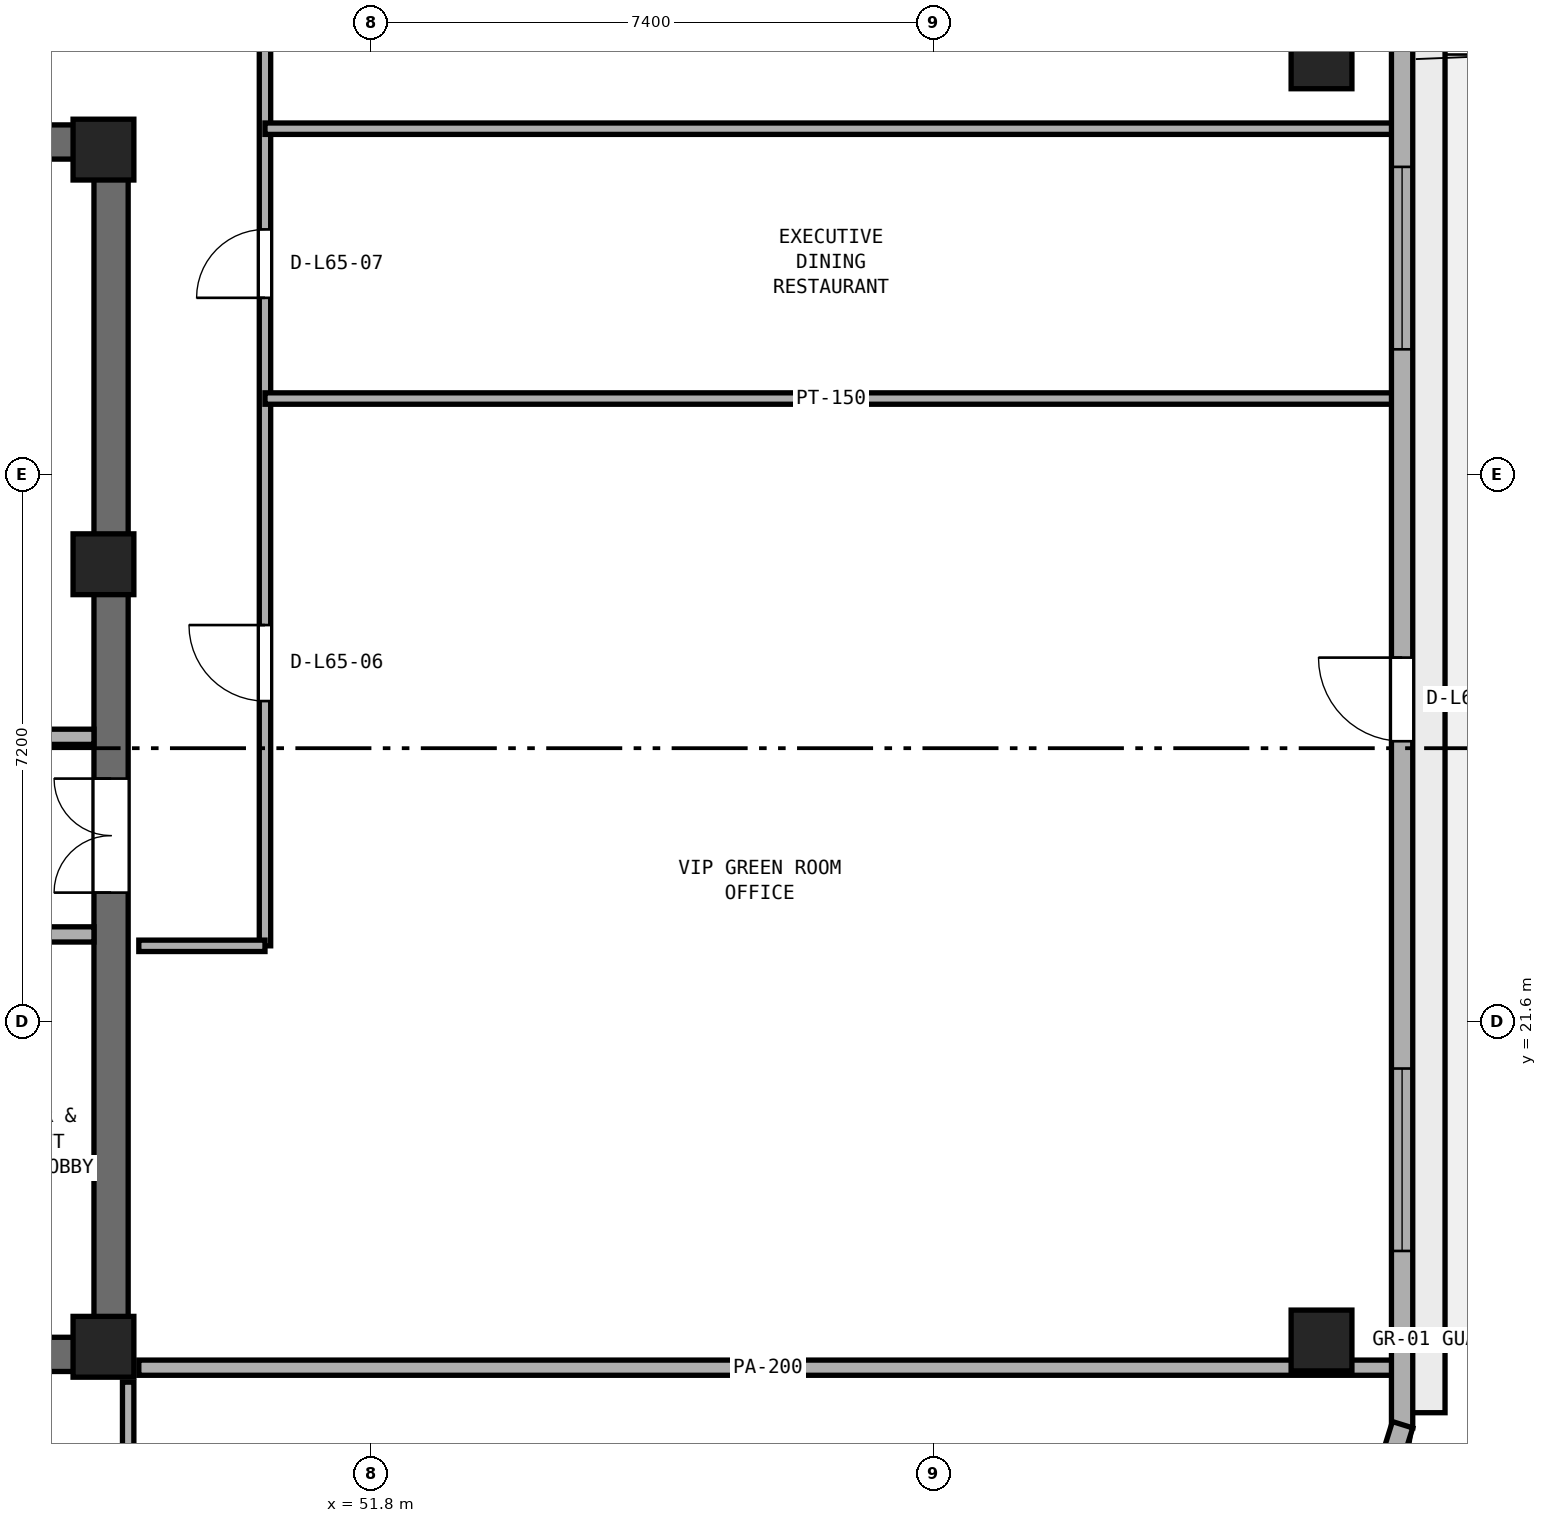
"""IFC4 building model, lengths in metres.
Left out: names, types, materials, properties, quantities, classifications, styles, units other than length and angle.
Written with IfcOpenShell. Run it as: python <this file> out.ifc"""

import sys

from ifc_helpers import new_model, si_unit, direction, frame, frame_2d, origin, origin_2d, place, context, subcontext, project, spatial, rectangle, extrude, element, fill, save


model = new_model("IFC4")
c1 = context("Model", 3, precision=1e-05, world=origin(), true_north=direction((0.0, 1.0)))
c2 = subcontext(c1, "Body", "Model", "MODEL_VIEW")
j1 = project(units=[si_unit("LENGTHUNIT", "METRE"), si_unit("PLANEANGLEUNIT", "RADIAN")], contexts=[c1])
p1 = place(None, origin())
s1 = spatial("IfcSite", under=j1, at=p1, CompositionType="ELEMENT")
p2 = place(p1, origin())
s2 = spatial("IfcBuilding", under=s1, at=p2, CompositionType="ELEMENT")
p3 = place(p2, frame((0.0, 0.0, 255.4)))
s3 = spatial("IfcBuildingStorey", under=s2, at=p3, CompositionType="ELEMENT", Elevation=255.4)
for number, where, z_axis, x_axis in (
    (1, (25.4, 17.225, 0.0), (0.0, 0.0, 1.0), (1.0, 0.0, 0.0)),
    (2, (25.4, 33.175, 0.0), (0.0, 0.0, 1.0), (1.0, 0.0, 0.0)),
):
    element("IfcWall", number, at=place(p3, frame(where, z_axis=z_axis, x_axis=x_axis)), inside=s3, PredefinedType="SHEAR", context=c2, shape_type="SweptSolid", body=[
        extrude(rectangle(XDim=23.2, YDim=0.45, at=frame_2d((11.6, 0.0))), origin(), (0.0, 0.0, 1.0), 3.51),
    ])
p4 = place(p3, frame((48.375, 17.45, 0.0), z_axis=(0.0, 0.0, 1.0), x_axis=(0.0, 1.0, 0.0)))
e3 = element("IfcWall", 3, at=p4, inside=s3, PredefinedType="SHEAR", context=c2, shape_type="SweptSolid", body=[
    extrude(rectangle(XDim=15.5, YDim=0.45, at=frame_2d((7.75, 0.0))), origin(), (0.0, 0.0, 1.0), 3.51),
])
p5 = place(p4, frame((5.85, 0.0, 0.0)))
e4 = element("IfcOpeningElement", 4, at=p5, cuts=e3, PredefinedType="OPENING", context=c2, shape_type="SweptSolid", body=[
    extrude(rectangle(XDim=1.5, YDim=2.15, at=frame_2d((0.75, 1.075))), frame((0.0, 0.235, 0.0), z_axis=(0.0, -1.0, 0.0), x_axis=(1.0, 0.0, 0.0)), (0.0, 0.0, 1.0), 0.47),
])
for number, where, z_axis, x_axis in (
    (5, (48.275, 17.325, 0.0), (0.0, 0.0, 1.0), (1.0, 0.0, 0.0)),
    (6, (48.275, 27.62, 0.0), (0.0, 0.0, 1.0), (1.0, 0.0, 0.0)),
    (7, (48.275, 33.075, 0.0), (0.0, 0.0, 1.0), (1.0, 0.0, 0.0)),
):
    element("IfcColumn", number, at=place(p3, frame(where, z_axis=z_axis, x_axis=x_axis)), inside=s3, PredefinedType="PILASTER", context=c2, shape_type="SweptSolid", body=[
        extrude(rectangle(XDim=0.8, YDim=0.8, at=origin_2d()), origin(), (0.0, 0.0, 1.0), 3.8),
    ])
for number, where, z_axis, x_axis in (
    (8, (64.3, 17.408, 0.0), (0.0, 0.0, 1.0), (1.0, 0.0, 0.0)),
    (9, (64.3, 34.276, 0.0), (0.0, 0.0, 1.0), (1.0, 0.0, 0.0)),
):
    element("IfcColumn", number, at=place(p3, frame(where, z_axis=z_axis, x_axis=x_axis)), inside=s3, PredefinedType="COLUMN", context=c2, shape_type="SweptSolid", body=[
        extrude(rectangle(XDim=0.8, YDim=0.8, at=origin_2d()), origin(), (0.0, 0.0, 1.0), 3.8),
    ])
p6 = place(p3, frame((42.0, 22.75, 0.0), z_axis=(0.0, 0.0, 1.0), x_axis=(1.0, 0.0, 0.0)))
e10 = element("IfcWall", 10, at=p6, inside=s3, PredefinedType="SOLIDWALL", context=c2, shape_type="SweptSolid", body=[
    extrude(rectangle(XDim=6.15, YDim=0.2, at=frame_2d((3.075, 0.0))), origin(), (0.0, 0.0, 1.0), 3.51),
])
p7 = place(p3, frame((46.1, 25.35, 0.0), z_axis=(0.0, 0.0, 1.0), x_axis=(1.0, 0.0, 0.0)))
e11 = element("IfcWall", 11, at=p7, inside=s3, PredefinedType="SOLIDWALL", context=c2, shape_type="SweptSolid", body=[
    extrude(rectangle(XDim=2.05, YDim=0.2, at=frame_2d((1.025, 0.0))), origin(), (0.0, 0.0, 1.0), 3.51),
])
p8 = place(p3, frame((50.4, 22.6, 0.0), z_axis=(0.0, 0.0, 1.0), x_axis=(0.0, 1.0, 0.0)))
e12 = element("IfcWall", 12, at=p8, inside=s3, PredefinedType="PARTITIONING", context=c2, shape_type="SweptSolid", body=[
    extrude(rectangle(XDim=12.6, YDim=0.15, at=frame_2d((6.3, 0.0))), origin(), (0.0, 0.0, 1.0), 3.51),
])
p9 = place(p8, frame((3.22, 0.0, 0.0)))
e13 = element("IfcOpeningElement", 13, at=p9, cuts=e12, PredefinedType="OPENING", context=c2, shape_type="SweptSolid", body=[
    extrude(rectangle(XDim=1.0, YDim=2.12, at=frame_2d((0.5, 1.06))), frame((0.0, 0.085, 0.0), z_axis=(0.0, -1.0, 0.0), x_axis=(1.0, 0.0, 0.0)), (0.0, 0.0, 1.0), 0.17),
])
p10 = place(p8, frame((8.525, 0.0, 0.0)))
e14 = element("IfcOpeningElement", 14, at=p10, cuts=e12, PredefinedType="OPENING", context=c2, shape_type="SweptSolid", body=[
    extrude(rectangle(XDim=0.9, YDim=2.1, at=frame_2d((0.45, 1.05))), frame((0.0, 0.085, 0.0), z_axis=(0.0, -1.0, 0.0), x_axis=(1.0, 0.0, 0.0)), (0.0, 0.0, 1.0), 0.17),
])
p11 = place(p3, frame((48.6, 15.2, 0.0), z_axis=(0.0, 0.0, 1.0), x_axis=(0.0, 1.0, 0.0)))
e15 = element("IfcWall", 15, at=p11, inside=s3, PredefinedType="PARTITIONING", context=c2, shape_type="SweptSolid", body=[
    extrude(rectangle(XDim=1.66, YDim=0.15, at=frame_2d((0.83, 0.0))), origin(), (0.0, 0.0, 1.0), 2.893),
])
p12 = place(p3, frame((48.74, 17.05, 0.0), z_axis=(0.0, 0.0, 1.0), x_axis=(1.0, 0.0, 0.0)))
e16 = element("IfcWall", 16, at=p12, inside=s3, PredefinedType="PARTITIONING", context=c2, shape_type="SweptSolid", body=[
    extrude(rectangle(XDim=16.555, YDim=0.2, at=frame_2d((8.277, 0.0))), origin(), (0.0, 0.0, 1.0), 2.893),
])
p13 = place(p3, frame((48.74, 22.6, 0.0), z_axis=(0.0, 0.0, 1.0), x_axis=(1.0, 0.0, 0.0)))
e17 = element("IfcWall", 17, at=p13, inside=s3, PredefinedType="PARTITIONING", context=c2, shape_type="SweptSolid", body=[
    extrude(rectangle(XDim=1.66, YDim=0.15, at=frame_2d((0.83, 0.0))), origin(), (0.0, 0.0, 1.0), 3.51),
])
p14 = place(p3, frame((50.4, 29.8, 0.0), z_axis=(0.0, 0.0, 1.0), x_axis=(1.0, 0.0, 0.0)))
e18 = element("IfcWall", 18, at=p14, inside=s3, PredefinedType="PARTITIONING", context=c2, shape_type="SweptSolid", body=[
    extrude(rectangle(XDim=14.895, YDim=0.15, at=frame_2d((7.448, 0.0))), origin(), (0.0, 0.0, 1.0), 3.51),
])
p15 = place(p3, frame((50.4, 33.35, 0.0), z_axis=(0.0, 0.0, 1.0), x_axis=(1.0, 0.0, 0.0)))
e19 = element("IfcWall", 19, at=p15, inside=s3, PredefinedType="PARTITIONING", context=c2, shape_type="SweptSolid", body=[
    extrude(rectangle(XDim=14.895, YDim=0.15, at=frame_2d((7.448, 0.0))), origin(), (0.0, 0.0, 1.0), 2.893),
])
p16 = place(p3, frame((65.36, 16.258, 0.0), z_axis=(0.0, 0.0, 1.0), x_axis=(0.0, 1.0, 0.0)))
e20 = element("IfcWall", 20, at=p16, inside=s3, PredefinedType="STANDARD", context=c2, shape_type="SweptSolid", body=[
    extrude(rectangle(XDim=19.168, YDim=0.28, at=frame_2d((9.584, 0.0))), origin(), (0.0, 0.0, 1.0), 3.51),
])
p17 = place(p16, frame((9.034, 0.0, 0.0)))
e21 = element("IfcOpeningElement", 21, at=p17, cuts=e20, PredefinedType="OPENING", context=c2, shape_type="SweptSolid", body=[
    extrude(rectangle(XDim=1.1, YDim=2.2, at=frame_2d((0.55, 1.1))), frame((0.0, 0.15, 0.0), z_axis=(0.0, -1.0, 0.0), x_axis=(1.0, 0.0, 0.0)), (0.0, 0.0, 1.0), 0.3),
])
p18 = place(p16, frame((2.328, 0.0, 0.9)))
e22 = element("IfcOpeningElement", 22, at=p18, cuts=e20, PredefinedType="OPENING", context=c2, shape_type="SweptSolid", body=[
    extrude(rectangle(XDim=2.4, YDim=1.75, at=frame_2d((1.2, 0.875))), frame((0.0, 0.15, 0.0), z_axis=(0.0, -1.0, 0.0), x_axis=(1.0, 0.0, 0.0)), (0.0, 0.0, 1.0), 0.3),
])
p19 = place(p16, frame((14.19, 0.0, 0.9)))
e23 = element("IfcOpeningElement", 23, at=p19, cuts=e20, PredefinedType="OPENING", context=c2, shape_type="SweptSolid", body=[
    extrude(rectangle(XDim=2.4, YDim=1.75, at=frame_2d((1.2, 0.875))), frame((0.0, 0.15, 0.0), z_axis=(0.0, -1.0, 0.0), x_axis=(1.0, 0.0, 0.0)), (0.0, 0.0, 1.0), 0.3),
])
p20 = place(p3, frame((64.635, 13.962, 0.0), z_axis=(0.0, 0.0, 1.0), x_axis=(0.298649578722, 0.954362839348, 0.0)))
e24 = element("IfcWall", 24, at=p20, inside=s3, PredefinedType="STANDARD", context=c2, shape_type="SweptSolid", body=[
    extrude(rectangle(XDim=2.449, YDim=0.28, at=frame_2d((1.225, 0.0))), origin(), (0.0, 0.0, 1.0), 3.51),
])
p21 = place(p5, origin())
e25 = element("IfcDoor", 25, at=p21, inside=s3, OperationType="DOUBLE_DOOR_SINGLE_SWING", PredefinedType="DOOR", context=c2, shape_type="SweptSolid", body=[
    extrude(rectangle(XDim=1.5, YDim=2.15, at=frame_2d((0.75, 1.075))), frame((0.0, 0.025, 0.0), z_axis=(0.0, -1.0, 0.0), x_axis=(1.0, 0.0, 0.0)), (0.0, 0.0, 1.0), 0.05),
])
fill(e4, e25)
p22 = place(p9, origin())
e26 = element("IfcDoor", 26, at=p22, inside=s3, OperationType="SINGLE_SWING_RIGHT", PredefinedType="DOOR", context=c2, shape_type="SweptSolid", body=[
    extrude(rectangle(XDim=1.0, YDim=2.12, at=frame_2d((0.5, 1.06))), frame((0.0, 0.025, 0.0), z_axis=(0.0, -1.0, 0.0), x_axis=(1.0, 0.0, 0.0)), (0.0, 0.0, 1.0), 0.05),
])
fill(e13, e26)
p23 = place(p10, origin())
e27 = element("IfcDoor", 27, at=p23, inside=s3, OperationType="SINGLE_SWING_LEFT", PredefinedType="DOOR", context=c2, shape_type="SweptSolid", body=[
    extrude(rectangle(XDim=0.9, YDim=2.1, at=frame_2d((0.45, 1.05))), frame((0.0, 0.025, 0.0), z_axis=(0.0, -1.0, 0.0), x_axis=(1.0, 0.0, 0.0)), (0.0, 0.0, 1.0), 0.05),
])
fill(e14, e27)
p24 = place(p17, origin())
e28 = element("IfcDoor", 28, at=p24, inside=s3, OperationType="SINGLE_SWING_RIGHT", PredefinedType="DOOR", context=c2, shape_type="SweptSolid", body=[
    extrude(rectangle(XDim=1.1, YDim=2.2, at=frame_2d((0.55, 1.1))), frame((0.0, 0.025, 0.0), z_axis=(0.0, -1.0, 0.0), x_axis=(1.0, 0.0, 0.0)), (0.0, 0.0, 1.0), 0.05),
])
fill(e21, e28)
p25 = place(p18, origin())
e29 = element("IfcWindow", 29, at=p25, inside=s3, PartitioningType="SINGLE_PANEL", PredefinedType="WINDOW", context=c2, shape_type="SweptSolid", body=[
    extrude(rectangle(XDim=2.4, YDim=1.75, at=frame_2d((1.2, 0.875))), frame((0.0, 0.03, 0.0), z_axis=(0.0, -1.0, 0.0), x_axis=(1.0, 0.0, 0.0)), (0.0, 0.0, 1.0), 0.06),
])
fill(e22, e29)
p26 = place(p19, origin())
e30 = element("IfcWindow", 30, at=p26, inside=s3, PartitioningType="SINGLE_PANEL", PredefinedType="WINDOW", context=c2, shape_type="SweptSolid", body=[
    extrude(rectangle(XDim=2.4, YDim=1.75, at=frame_2d((1.2, 0.875))), frame((0.0, 0.03, 0.0), z_axis=(0.0, -1.0, 0.0), x_axis=(1.0, 0.0, 0.0)), (0.0, 0.0, 1.0), 0.06),
])
fill(e23, e30)
save(model, sys.argv[1])
